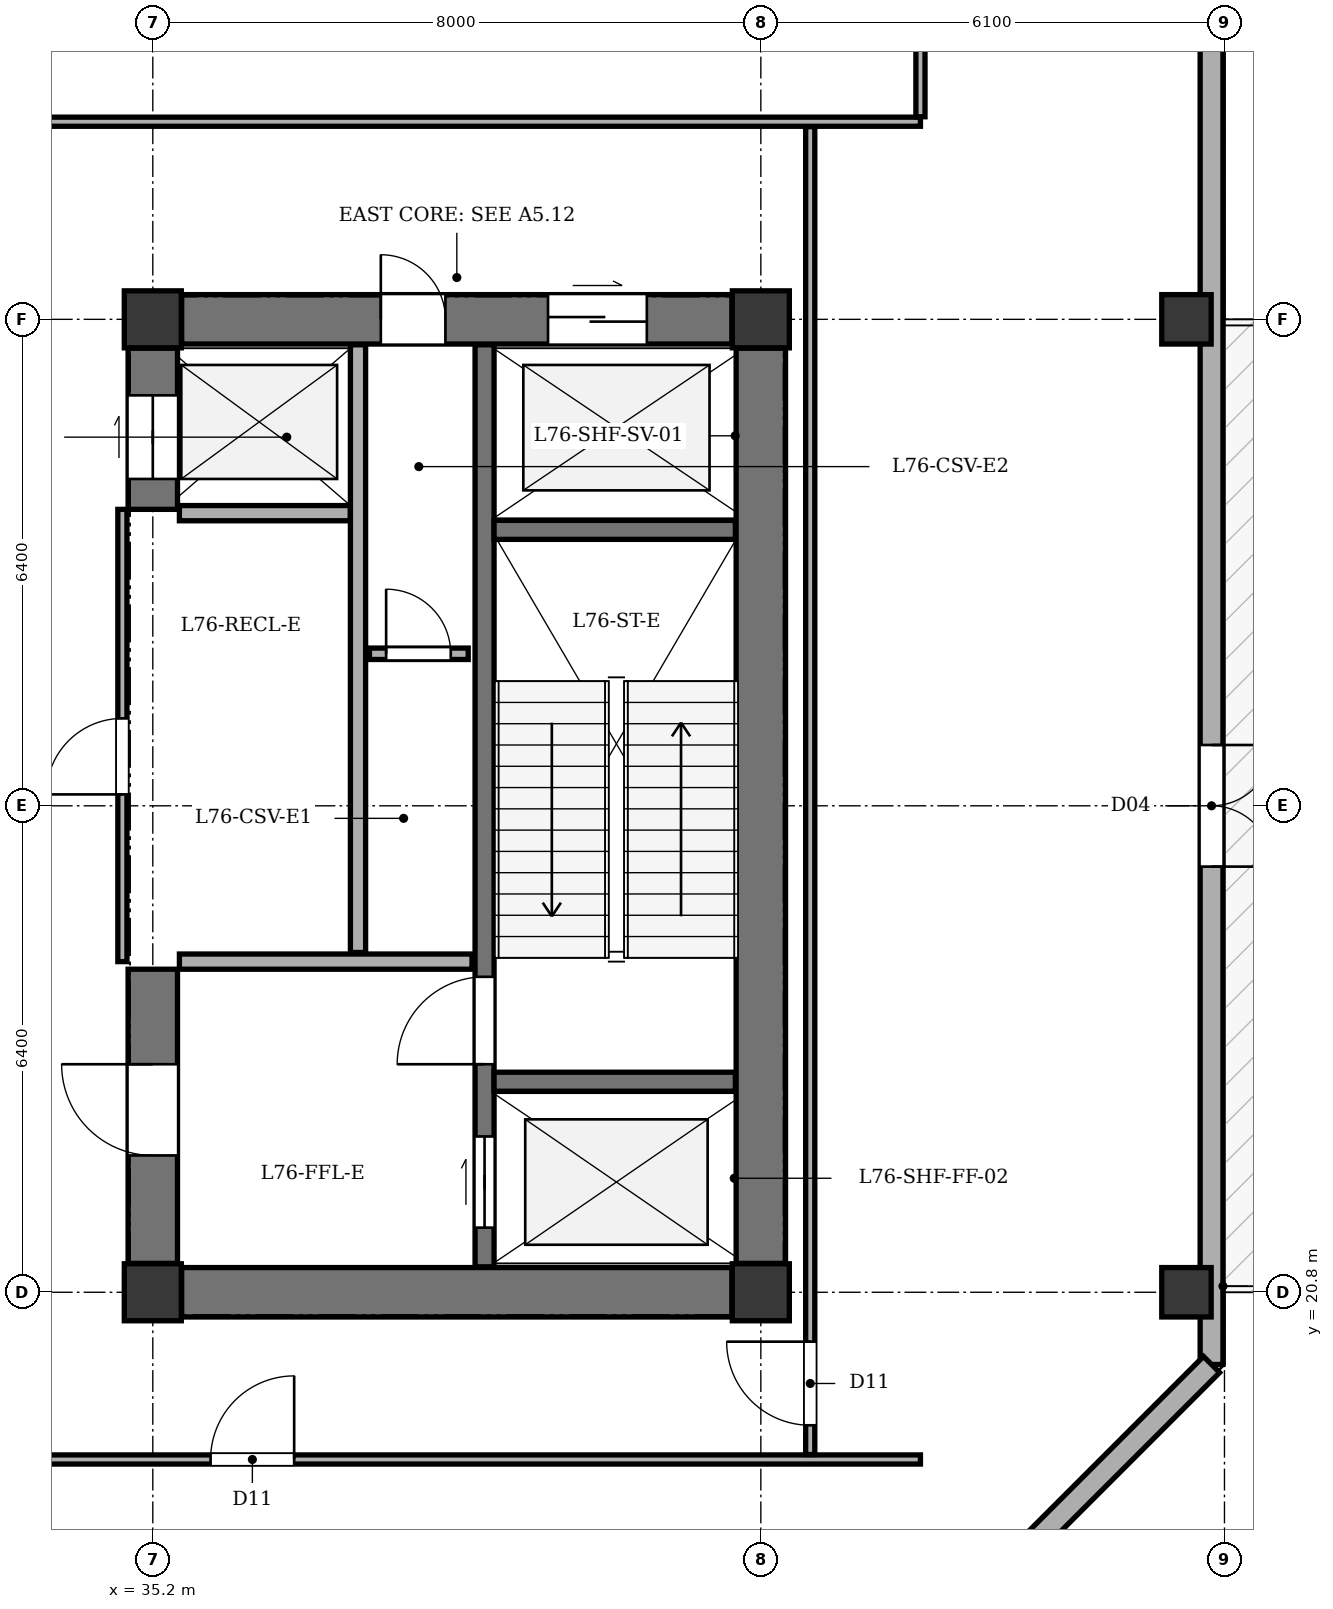
"""IFC4 building model, lengths in metres.
Left out: names, types, materials, properties, quantities, classifications, styles, units other than length and angle.
Written with IfcOpenShell. Run it as: python <this file> out.ifc"""

import sys

from ifc_helpers import new_model, si_unit, direction, frame, frame_2d, origin, origin_2d, place, context, subcontext, project, spatial, rectangle, extrude, element, fill, save


model = new_model("IFC4")
c1 = context("Model", 3, precision=1e-05, world=origin(), true_north=direction((0.0, 1.0)))
c2 = subcontext(c1, "Body", "Model", "MODEL_VIEW")
j1 = project(units=[si_unit("LENGTHUNIT", "METRE"), si_unit("PLANEANGLEUNIT", "RADIAN")], contexts=[c1])
p1 = place(None, origin())
s1 = spatial("IfcSite", under=j1, at=p1, CompositionType="ELEMENT")
p2 = place(p1, origin())
s2 = spatial("IfcBuilding", under=s1, at=p2, CompositionType="ELEMENT")
p3 = place(p2, frame((0.0, 0.0, 287.4)))
s3 = spatial("IfcBuildingStorey", under=s2, at=p3, CompositionType="ELEMENT", Elevation=287.4)
for number, where, z_axis, x_axis in (
    (1, (35.2, 20.8, 0.0), (0.0, 0.0, 1.0), (1.0, 0.0, 0.0)),
    (2, (43.2, 20.8, 0.0), (0.0, 0.0, 1.0), (1.0, 0.0, 0.0)),
    (3, (35.2, 33.6, 0.0), (0.0, 0.0, 1.0), (1.0, 0.0, 0.0)),
    (4, (43.2, 33.6, 0.0), (0.0, 0.0, 1.0), (1.0, 0.0, 0.0)),
):
    element("IfcColumn", number, at=place(p3, frame(where, z_axis=z_axis, x_axis=x_axis)), inside=s3, PredefinedType="COLUMN", context=c2, shape_type="SweptSolid", body=[
        extrude(rectangle(XDim=0.75, YDim=0.75, at=origin_2d()), origin(), (0.0, 0.0, 1.0), 4.8),
    ])
for number, where, z_axis, x_axis in (
    (5, (48.8, 20.8, 0.0), (0.0, 0.0, 1.0), (1.0, 0.0, 0.0)),
    (6, (48.8, 33.6, 0.0), (0.0, 0.0, 1.0), (1.0, 0.0, 0.0)),
):
    element("IfcColumn", number, at=place(p3, frame(where, z_axis=z_axis, x_axis=x_axis)), inside=s3, PredefinedType="COLUMN", context=c2, shape_type="SweptSolid", body=[
        extrude(rectangle(XDim=0.65, YDim=0.65, at=origin_2d()), origin(), (0.0, 0.0, 1.0), 4.8),
    ])
p4 = place(p3, frame((49.13, 41.1, 0.0), z_axis=(0.0, 0.0, 1.0), x_axis=(0.0, -1.0, 0.0)))
e7 = element("IfcWall", 7, at=p4, inside=s3, PredefinedType="STANDARD", context=c2, shape_type="SweptSolid", body=[
    extrude(rectangle(XDim=21.25, YDim=0.3, at=frame_2d((10.625, 0.0))), origin(), (0.0, 0.0, 1.0), 3.735),
])
p5 = place(p4, frame((13.1, 0.0, 0.0)))
e8 = element("IfcOpeningElement", 8, at=p5, cuts=e7, PredefinedType="OPENING", context=c2, shape_type="SweptSolid", body=[
    extrude(rectangle(XDim=1.6, YDim=2.2, at=frame_2d((0.8, 1.1))), frame((0.0, 0.16, 0.0), z_axis=(0.0, -1.0, 0.0), x_axis=(1.0, 0.0, 0.0)), (0.0, 0.0, 1.0), 0.32),
])
p6 = place(p3, frame((49.13, 19.85, 0.0), z_axis=(0.0, 0.0, 1.0), x_axis=(-0.707084243559, -0.707129318095, 0.0)))
e9 = element("IfcWall", 9, at=p6, inside=s3, PredefinedType="STANDARD", context=c2, shape_type="SweptSolid", body=[
    extrude(rectangle(XDim=5.416, YDim=0.3, at=frame_2d((2.708, 0.0))), origin(), (0.0, 0.0, 1.0), 3.735),
])
p7 = place(p3, frame((43.2, 21.18, 0.0), z_axis=(0.0, 0.0, 1.0), x_axis=(0.0, 1.0, 0.0)))
e10 = element("IfcWall", 10, at=p7, inside=s3, PredefinedType="SHEAR", context=c2, shape_type="SweptSolid", body=[
    extrude(rectangle(XDim=12.04, YDim=0.65, at=frame_2d((6.02, 0.0))), origin(), (0.0, 0.0, 1.0), 4.35),
])
p8 = place(p3, frame((35.58, 20.8, 0.0), z_axis=(0.0, 0.0, 1.0), x_axis=(1.0, 0.0, 0.0)))
e11 = element("IfcWall", 11, at=p8, inside=s3, PredefinedType="SHEAR", context=c2, shape_type="SweptSolid", body=[
    extrude(rectangle(XDim=7.24, YDim=0.65, at=frame_2d((3.62, 0.0))), origin(), (0.0, 0.0, 1.0), 4.35),
])
p9 = place(p3, frame((35.58, 33.6, 0.0), z_axis=(0.0, 0.0, 1.0), x_axis=(1.0, 0.0, 0.0)))
e12 = element("IfcWall", 12, at=p9, inside=s3, PredefinedType="SHEAR", context=c2, shape_type="SweptSolid", body=[
    extrude(rectangle(XDim=7.24, YDim=0.65, at=frame_2d((3.62, 0.0))), origin(), (0.0, 0.0, 1.0), 4.35),
])
p10 = place(p9, frame((4.82, 0.0, 0.0)))
e13 = element("IfcOpeningElement", 13, at=p10, cuts=e12, PredefinedType="OPENING", context=c2, shape_type="SweptSolid", body=[
    extrude(rectangle(XDim=1.3, YDim=2.15, at=frame_2d((0.65, 1.075))), frame((0.0, 0.335, 0.0), z_axis=(0.0, -1.0, 0.0), x_axis=(1.0, 0.0, 0.0)), (0.0, 0.0, 1.0), 0.67),
])
p11 = place(p9, frame((2.62, 0.0, 0.0)))
e14 = element("IfcOpeningElement", 14, at=p11, cuts=e12, PredefinedType="OPENING", context=c2, shape_type="SweptSolid", body=[
    extrude(rectangle(XDim=0.85, YDim=2.02, at=frame_2d((0.425, 1.01))), frame((0.0, 0.335, 0.0), z_axis=(0.0, -1.0, 0.0), x_axis=(1.0, 0.0, 0.0)), (0.0, 0.0, 1.0), 0.67),
])
p12 = place(p3, frame((35.2, 21.18, 0.0), z_axis=(0.0, 0.0, 1.0), x_axis=(0.0, 1.0, 0.0)))
e15 = element("IfcWall", 15, at=p12, inside=s3, PredefinedType="SHEAR", context=c2, shape_type="SweptSolid", body=[
    extrude(rectangle(XDim=3.87, YDim=0.65, at=frame_2d((1.935, 0.0))), origin(), (0.0, 0.0, 1.0), 4.35),
])
p13 = place(p12, frame((1.42, 0.0, 0.0)))
e16 = element("IfcOpeningElement", 16, at=p13, cuts=e15, PredefinedType="OPENING", context=c2, shape_type="SweptSolid", body=[
    extrude(rectangle(XDim=1.2, YDim=2.15, at=frame_2d((0.6, 1.075))), frame((0.0, 0.335, 0.0), z_axis=(0.0, -1.0, 0.0), x_axis=(1.0, 0.0, 0.0)), (0.0, 0.0, 1.0), 0.67),
])
p14 = place(p3, frame((35.2, 31.1, 0.0), z_axis=(0.0, 0.0, 1.0), x_axis=(0.0, 1.0, 0.0)))
e17 = element("IfcWall", 17, at=p14, inside=s3, PredefinedType="SHEAR", context=c2, shape_type="SweptSolid", body=[
    extrude(rectangle(XDim=2.12, YDim=0.65, at=frame_2d((1.06, 0.0))), origin(), (0.0, 0.0, 1.0), 4.35),
])
p15 = place(p14, frame((0.4, 0.0, 0.0)))
e18 = element("IfcOpeningElement", 18, at=p15, cuts=e17, PredefinedType="OPENING", context=c2, shape_type="SweptSolid", body=[
    extrude(rectangle(XDim=1.1, YDim=2.1, at=frame_2d((0.55, 1.05))), frame((0.0, 0.335, 0.0), z_axis=(0.0, -1.0, 0.0), x_axis=(1.0, 0.0, 0.0)), (0.0, 0.0, 1.0), 0.67),
])
p16 = place(p3, frame((39.565, 21.135, 0.0), z_axis=(0.0, 0.0, 1.0), x_axis=(0.0, 1.0, 0.0)))
e19 = element("IfcWall", 19, at=p16, inside=s3, PredefinedType="SHEAR", context=c2, shape_type="SweptSolid", body=[
    extrude(rectangle(XDim=12.13, YDim=0.25, at=frame_2d((6.065, 0.0))), origin(), (0.0, 0.0, 1.0), 4.35),
])
p17 = place(p16, frame((0.515, 0.0, 0.0)))
e20 = element("IfcOpeningElement", 20, at=p17, cuts=e19, PredefinedType="OPENING", context=c2, shape_type="SweptSolid", body=[
    extrude(rectangle(XDim=1.2, YDim=2.15, at=frame_2d((0.6, 1.075))), frame((0.0, 0.135, 0.0), z_axis=(0.0, -1.0, 0.0), x_axis=(1.0, 0.0, 0.0)), (0.0, 0.0, 1.0), 0.27),
])
p18 = place(p16, frame((2.665, 0.0, 0.0)))
e21 = element("IfcOpeningElement", 21, at=p18, cuts=e19, PredefinedType="OPENING", context=c2, shape_type="SweptSolid", body=[
    extrude(rectangle(XDim=1.15, YDim=2.15, at=frame_2d((0.575, 1.075))), frame((0.0, 0.135, 0.0), z_axis=(0.0, -1.0, 0.0), x_axis=(1.0, 0.0, 0.0)), (0.0, 0.0, 1.0), 0.27),
])
for number, where, z_axis, x_axis in (
    (22, (39.69, 23.57, 0.0), (0.0, 0.0, 1.0), (1.0, 0.0, 0.0)),
    (23, (39.69, 30.83, 0.0), (0.0, 0.0, 1.0), (1.0, 0.0, 0.0)),
):
    element("IfcWall", number, at=place(p3, frame(where, z_axis=z_axis, x_axis=x_axis)), inside=s3, PredefinedType="SHEAR", context=c2, shape_type="SweptSolid", body=[
        extrude(rectangle(XDim=3.175, YDim=0.25, at=frame_2d((1.587, 0.0))), origin(), (0.0, 0.0, 1.0), 4.35),
    ])
p19 = place(p3, frame((35.55, 25.15, 0.0), z_axis=(0.0, 0.0, 1.0), x_axis=(1.0, 0.0, 0.0)))
e24 = element("IfcWall", 24, at=p19, inside=s3, PredefinedType="SOLIDWALL", context=c2, shape_type="SweptSolid", body=[
    extrude(rectangle(XDim=3.85, YDim=0.2, at=frame_2d((1.925, 0.0))), origin(), (0.0, 0.0, 1.0), 4.35),
])
p20 = place(p3, frame((35.55, 31.05, 0.0), z_axis=(0.0, 0.0, 1.0), x_axis=(1.0, 0.0, 0.0)))
e25 = element("IfcWall", 25, at=p20, inside=s3, PredefinedType="SOLIDWALL", context=c2, shape_type="SweptSolid", body=[
    extrude(rectangle(XDim=2.25, YDim=0.2, at=frame_2d((1.125, 0.0))), origin(), (0.0, 0.0, 1.0), 4.35),
])
p21 = place(p3, frame((37.9, 25.27, 0.0), z_axis=(0.0, 0.0, 1.0), x_axis=(0.0, 1.0, 0.0)))
e26 = element("IfcWall", 26, at=p21, inside=s3, PredefinedType="SOLIDWALL", context=c2, shape_type="SweptSolid", body=[
    extrude(rectangle(XDim=7.995, YDim=0.2, at=frame_2d((3.998, 0.0))), origin(), (0.0, 0.0, 1.0), 4.35),
])
p22 = place(p3, frame((38.05, 29.2, 0.0), z_axis=(0.0, 0.0, 1.0), x_axis=(1.0, 0.0, 0.0)))
e27 = element("IfcWall", 27, at=p22, inside=s3, PredefinedType="PARTITIONING", context=c2, shape_type="SweptSolid", body=[
    extrude(rectangle(XDim=1.3, YDim=0.15, at=frame_2d((0.65, 0.0))), origin(), (0.0, 0.0, 1.0), 4.35),
])
p23 = place(p22, frame((0.22, 0.0, 0.0)))
e28 = element("IfcOpeningElement", 28, at=p23, cuts=e27, PredefinedType="OPENING", context=c2, shape_type="SweptSolid", body=[
    extrude(rectangle(XDim=0.85, YDim=2.02, at=frame_2d((0.425, 1.01))), frame((0.0, 0.085, 0.0), z_axis=(0.0, -1.0, 0.0), x_axis=(1.0, 0.0, 0.0)), (0.0, 0.0, 1.0), 0.17),
])
p24 = place(p3, frame((34.8, 25.15, 0.0), z_axis=(0.0, 0.0, 1.0), x_axis=(0.0, 1.0, 0.0)))
e29 = element("IfcWall", 29, at=p24, inside=s3, PredefinedType="PARTITIONING", context=c2, shape_type="SweptSolid", body=[
    extrude(rectangle(XDim=5.95, YDim=0.12, at=frame_2d((2.975, 0.0))), origin(), (0.0, 0.0, 1.0), 4.35),
])
p25 = place(p24, frame((2.2, 0.0, 0.0)))
e30 = element("IfcOpeningElement", 30, at=p25, cuts=e29, PredefinedType="OPENING", context=c2, shape_type="SweptSolid", body=[
    extrude(rectangle(XDim=1.0, YDim=2.1, at=frame_2d((0.5, 1.05))), frame((0.0, 0.07, 0.0), z_axis=(0.0, -1.0, 0.0), x_axis=(1.0, 0.0, 0.0)), (0.0, 0.0, 1.0), 0.14),
])
p26 = place(p3, frame((8.3, 18.6, 0.0), z_axis=(0.0, 0.0, 1.0), x_axis=(1.0, 0.0, 0.0)))
e31 = element("IfcWall", 31, at=p26, inside=s3, PredefinedType="PARTITIONING", context=c2, shape_type="SweptSolid", body=[
    extrude(rectangle(XDim=37.0, YDim=0.12, at=frame_2d((18.5, 0.0))), origin(), (0.0, 0.0, 1.0), 4.35),
])
p27 = place(p26, frame((2.5, 0.0, 0.0)))
e32 = element("IfcOpeningElement", 32, at=p27, cuts=e31, PredefinedType="OPENING", context=c2, shape_type="SweptSolid", body=[
    extrude(rectangle(XDim=1.1, YDim=2.15, at=frame_2d((0.55, 1.075))), frame((0.0, 0.07, 0.0), z_axis=(0.0, -1.0, 0.0), x_axis=(1.0, 0.0, 0.0)), (0.0, 0.0, 1.0), 0.14),
])
p28 = place(p26, frame((15.08, 0.0, 0.0)))
e33 = element("IfcOpeningElement", 33, at=p28, cuts=e31, PredefinedType="OPENING", context=c2, shape_type="SweptSolid", body=[
    extrude(rectangle(XDim=1.1, YDim=2.15, at=frame_2d((0.55, 1.075))), frame((0.0, 0.07, 0.0), z_axis=(0.0, -1.0, 0.0), x_axis=(1.0, 0.0, 0.0)), (0.0, 0.0, 1.0), 0.14),
])
p29 = place(p26, frame((27.66, 0.0, 0.0)))
e34 = element("IfcOpeningElement", 34, at=p29, cuts=e31, PredefinedType="OPENING", context=c2, shape_type="SweptSolid", body=[
    extrude(rectangle(XDim=1.1, YDim=2.15, at=frame_2d((0.55, 1.075))), frame((0.0, 0.07, 0.0), z_axis=(0.0, -1.0, 0.0), x_axis=(1.0, 0.0, 0.0)), (0.0, 0.0, 1.0), 0.14),
])
p30 = place(p3, frame((8.3, 36.2, 0.0), z_axis=(0.0, 0.0, 1.0), x_axis=(1.0, 0.0, 0.0)))
e35 = element("IfcWall", 35, at=p30, inside=s3, PredefinedType="PARTITIONING", context=c2, shape_type="SweptSolid", body=[
    extrude(rectangle(XDim=37.0, YDim=0.12, at=frame_2d((18.5, 0.0))), origin(), (0.0, 0.0, 1.0), 4.35),
])
p31 = place(p30, frame((1.3, 0.0, 0.0)))
e36 = element("IfcOpeningElement", 36, at=p31, cuts=e35, PredefinedType="OPENING", context=c2, shape_type="SweptSolid", body=[
    extrude(rectangle(XDim=0.95, YDim=2.1, at=frame_2d((0.475, 1.05))), frame((0.0, 0.07, 0.0), z_axis=(0.0, -1.0, 0.0), x_axis=(1.0, 0.0, 0.0)), (0.0, 0.0, 1.0), 0.14),
])
p32 = place(p30, frame((4.9, 0.0, 0.0)))
e37 = element("IfcOpeningElement", 37, at=p32, cuts=e35, PredefinedType="OPENING", context=c2, shape_type="SweptSolid", body=[
    extrude(rectangle(XDim=0.95, YDim=2.1, at=frame_2d((0.475, 1.05))), frame((0.0, 0.07, 0.0), z_axis=(0.0, -1.0, 0.0), x_axis=(1.0, 0.0, 0.0)), (0.0, 0.0, 1.0), 0.14),
])
p33 = place(p30, frame((8.3, 0.0, 0.0)))
e38 = element("IfcOpeningElement", 38, at=p33, cuts=e35, PredefinedType="OPENING", context=c2, shape_type="SweptSolid", body=[
    extrude(rectangle(XDim=1.0, YDim=2.1, at=frame_2d((0.5, 1.05))), frame((0.0, 0.07, 0.0), z_axis=(0.0, -1.0, 0.0), x_axis=(1.0, 0.0, 0.0)), (0.0, 0.0, 1.0), 0.14),
])
p34 = place(p30, frame((13.5, 0.0, 0.0)))
e39 = element("IfcOpeningElement", 39, at=p34, cuts=e35, PredefinedType="OPENING", context=c2, shape_type="SweptSolid", body=[
    extrude(rectangle(XDim=1.5, YDim=2.15, at=frame_2d((0.75, 1.075))), frame((0.0, 0.07, 0.0), z_axis=(0.0, -1.0, 0.0), x_axis=(1.0, 0.0, 0.0)), (0.0, 0.0, 1.0), 0.14),
])
p35 = place(p3, frame((45.3, 36.265, 0.0), z_axis=(0.0, 0.0, 1.0), x_axis=(0.0, 1.0, 0.0)))
e40 = element("IfcWall", 40, at=p35, inside=s3, PredefinedType="PARTITIONING", context=c2, shape_type="SweptSolid", body=[
    extrude(rectangle(XDim=8.51, YDim=0.12, at=frame_2d((4.255, 0.0))), origin(), (0.0, 0.0, 1.0), 4.35),
])
p36 = place(p3, frame((43.85, 18.665, 0.0), z_axis=(0.0, 0.0, 1.0), x_axis=(0.0, 1.0, 0.0)))
e41 = element("IfcWall", 41, at=p36, inside=s3, PredefinedType="PARTITIONING", context=c2, shape_type="SweptSolid", body=[
    extrude(rectangle(XDim=17.47, YDim=0.12, at=frame_2d((8.735, 0.0))), origin(), (0.0, 0.0, 1.0), 4.35),
])
p37 = place(p36, frame((0.385, 0.0, 0.0)))
e42 = element("IfcOpeningElement", 42, at=p37, cuts=e41, PredefinedType="OPENING", context=c2, shape_type="SweptSolid", body=[
    extrude(rectangle(XDim=1.1, YDim=2.15, at=frame_2d((0.55, 1.075))), frame((0.0, 0.07, 0.0), z_axis=(0.0, -1.0, 0.0), x_axis=(1.0, 0.0, 0.0)), (0.0, 0.0, 1.0), 0.14),
])
p38 = place(p5, origin())
e43 = element("IfcDoor", 43, at=p38, inside=s3, OperationType="DOUBLE_DOOR_SINGLE_SWING", PredefinedType="DOOR", context=c2, shape_type="SweptSolid", body=[
    extrude(rectangle(XDim=1.6, YDim=2.2, at=frame_2d((0.8, 1.1))), frame((0.0, 0.025, 0.0), z_axis=(0.0, -1.0, 0.0), x_axis=(1.0, 0.0, 0.0)), (0.0, 0.0, 1.0), 0.05),
])
fill(e8, e43)
p39 = place(p10, origin())
e44 = element("IfcDoor", 44, at=p39, inside=s3, OperationType="DOUBLE_DOOR_SLIDING", PredefinedType="DOOR", context=c2, shape_type="SweptSolid", body=[
    extrude(rectangle(XDim=1.3, YDim=2.15, at=frame_2d((0.65, 1.075))), frame((0.0, 0.025, 0.0), z_axis=(0.0, -1.0, 0.0), x_axis=(1.0, 0.0, 0.0)), (0.0, 0.0, 1.0), 0.05),
])
fill(e13, e44)
p40 = place(p11, origin())
e45 = element("IfcDoor", 45, at=p40, inside=s3, OperationType="SINGLE_SWING_LEFT", PredefinedType="DOOR", context=c2, shape_type="SweptSolid", body=[
    extrude(rectangle(XDim=0.85, YDim=2.02, at=frame_2d((0.425, 1.01))), frame((0.0, 0.025, 0.0), z_axis=(0.0, -1.0, 0.0), x_axis=(1.0, 0.0, 0.0)), (0.0, 0.0, 1.0), 0.05),
])
fill(e14, e45)
p41 = place(p13, origin())
e46 = element("IfcDoor", 46, at=p41, inside=s3, OperationType="SINGLE_SWING_RIGHT", PredefinedType="DOOR", context=c2, shape_type="SweptSolid", body=[
    extrude(rectangle(XDim=1.2, YDim=2.15, at=frame_2d((0.6, 1.075))), frame((0.0, 0.025, 0.0), z_axis=(0.0, -1.0, 0.0), x_axis=(1.0, 0.0, 0.0)), (0.0, 0.0, 1.0), 0.05),
])
fill(e16, e46)
p42 = place(p15, origin())
e47 = element("IfcDoor", 47, at=p42, inside=s3, OperationType="DOUBLE_DOOR_SLIDING", PredefinedType="DOOR", context=c2, shape_type="SweptSolid", body=[
    extrude(rectangle(XDim=1.1, YDim=2.1, at=frame_2d((0.55, 1.05))), frame((0.0, 0.025, 0.0), z_axis=(0.0, -1.0, 0.0), x_axis=(1.0, 0.0, 0.0)), (0.0, 0.0, 1.0), 0.05),
])
fill(e18, e47)
p43 = place(p17, origin())
e48 = element("IfcDoor", 48, at=p43, inside=s3, OperationType="DOUBLE_DOOR_SLIDING", PredefinedType="DOOR", context=c2, shape_type="SweptSolid", body=[
    extrude(rectangle(XDim=1.2, YDim=2.15, at=frame_2d((0.6, 1.075))), frame((0.0, 0.025, 0.0), z_axis=(0.0, -1.0, 0.0), x_axis=(1.0, 0.0, 0.0)), (0.0, 0.0, 1.0), 0.05),
])
fill(e20, e48)
p44 = place(p18, origin())
e49 = element("IfcDoor", 49, at=p44, inside=s3, OperationType="SINGLE_SWING_LEFT", PredefinedType="DOOR", context=c2, shape_type="SweptSolid", body=[
    extrude(rectangle(XDim=1.15, YDim=2.15, at=frame_2d((0.575, 1.075))), frame((0.0, 0.025, 0.0), z_axis=(0.0, -1.0, 0.0), x_axis=(1.0, 0.0, 0.0)), (0.0, 0.0, 1.0), 0.05),
])
fill(e21, e49)
p45 = place(p23, origin())
e50 = element("IfcDoor", 50, at=p45, inside=s3, OperationType="SINGLE_SWING_LEFT", PredefinedType="DOOR", context=c2, shape_type="SweptSolid", body=[
    extrude(rectangle(XDim=0.85, YDim=2.02, at=frame_2d((0.425, 1.01))), frame((0.0, 0.025, 0.0), z_axis=(0.0, -1.0, 0.0), x_axis=(1.0, 0.0, 0.0)), (0.0, 0.0, 1.0), 0.05),
])
fill(e28, e50)
p46 = place(p25, origin())
e51 = element("IfcDoor", 51, at=p46, inside=s3, OperationType="SINGLE_SWING_LEFT", PredefinedType="DOOR", context=c2, shape_type="SweptSolid", body=[
    extrude(rectangle(XDim=1.0, YDim=2.1, at=frame_2d((0.5, 1.05))), frame((0.0, 0.025, 0.0), z_axis=(0.0, -1.0, 0.0), x_axis=(1.0, 0.0, 0.0)), (0.0, 0.0, 1.0), 0.05),
])
fill(e30, e51)
p47 = place(p29, origin())
e52 = element("IfcDoor", 52, at=p47, inside=s3, OperationType="SINGLE_SWING_RIGHT", PredefinedType="DOOR", context=c2, shape_type="SweptSolid", body=[
    extrude(rectangle(XDim=1.1, YDim=2.15, at=frame_2d((0.55, 1.075))), frame((0.0, 0.025, 0.0), z_axis=(0.0, -1.0, 0.0), x_axis=(1.0, 0.0, 0.0)), (0.0, 0.0, 1.0), 0.05),
])
fill(e34, e52)
p48 = place(p37, origin())
e53 = element("IfcDoor", 53, at=p48, inside=s3, OperationType="SINGLE_SWING_RIGHT", PredefinedType="DOOR", context=c2, shape_type="SweptSolid", body=[
    extrude(rectangle(XDim=1.1, YDim=2.15, at=frame_2d((0.55, 1.075))), frame((0.0, 0.025, 0.0), z_axis=(0.0, -1.0, 0.0), x_axis=(1.0, 0.0, 0.0)), (0.0, 0.0, 1.0), 0.05),
])
fill(e42, e53)
save(model, sys.argv[1])
